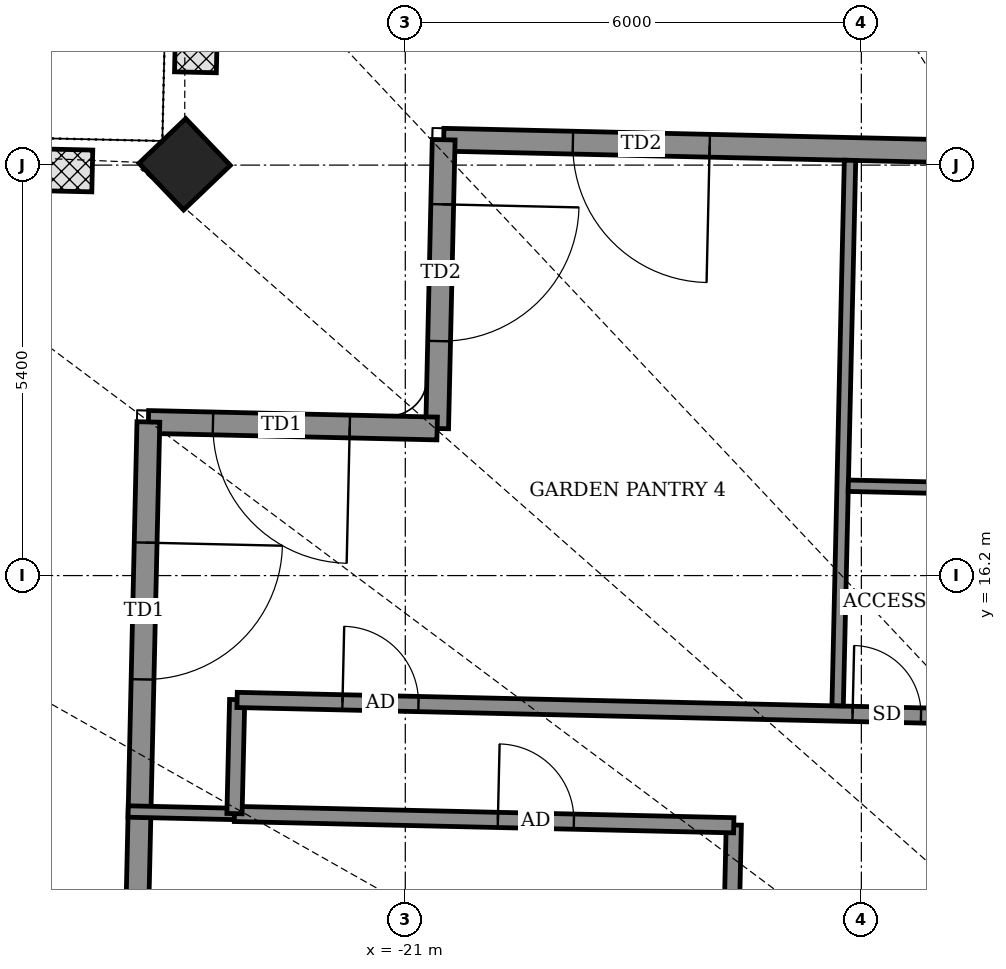
"""IFC4 building model, lengths in metres.
Left out: names, types, materials, properties, quantities, classifications, styles, units other than length and angle.
Written with IfcOpenShell. Run it as: python <this file> out.ifc"""

import sys

from ifc_helpers import new_model, si_unit, direction, frame, frame_2d, origin, origin_2d, place, context, subcontext, project, spatial, rectangle, extrude, element, fill, save


model = new_model("IFC4")
c1 = context("Model", 3, precision=1e-05, world=origin(), true_north=direction((0.0, 1.0)))
c2 = subcontext(c1, "Body", "Model", "MODEL_VIEW")
j1 = project(units=[si_unit("LENGTHUNIT", "METRE"), si_unit("PLANEANGLEUNIT", "RADIAN")], contexts=[c1])
p1 = place(None, origin())
s1 = spatial("IfcSite", under=j1, at=p1, CompositionType="ELEMENT")
p2 = place(p1, origin())
s2 = spatial("IfcBuilding", under=s1, at=p2, CompositionType="ELEMENT")
p3 = place(p2, frame((0.0, 0.0, 337.9)))
s3 = spatial("IfcBuildingStorey", under=s2, at=p3, CompositionType="ELEMENT", Elevation=337.9)
p4 = place(p3, frame((-23.902, 21.611, -0.55), z_axis=(0.0, 0.0, 1.0), x_axis=(-0.723010312757, -0.690837236726, 0.0)))
e1 = element("IfcColumn", 1, at=p4, inside=s3, PredefinedType="COLUMN", context=c2, shape_type="SweptSolid", body=[
    extrude(rectangle(XDim=0.85, YDim=0.85, at=origin_2d()), origin(), (0.0, 0.0, 1.0), 4.6),
])
p5 = place(p3, frame((23.394, 20.938, 0.0), z_axis=(0.0, 0.0, 1.0), x_axis=(-0.99974255281, 0.02268982375, 0.0)))
e2 = element("IfcWall", 2, at=p5, inside=s3, PredefinedType="SOLIDWALL", context=c2, shape_type="SweptSolid", body=[
    extrude(rectangle(XDim=43.9, YDim=0.3, at=frame_2d((21.95, 0.0))), origin(), (0.0, 0.0, 1.0), 2.1),
])
p6 = place(p5, frame((3.151, 0.0, 0.0)))
e3 = element("IfcOpeningElement", 3, at=p6, cuts=e2, PredefinedType="OPENING", context=c2, shape_type="SweptSolid", body=[
    extrude(rectangle(XDim=1.8, YDim=2.0, at=frame_2d((0.9, 1.0))), frame((0.0, 0.16, 0.0), z_axis=(0.0, -1.0, 0.0), x_axis=(1.0, 0.0, 0.0)), (0.0, 0.0, 1.0), 0.32),
])
p7 = place(p5, frame((8.825, 0.0, 0.0)))
e4 = element("IfcOpeningElement", 4, at=p7, cuts=e2, PredefinedType="OPENING", context=c2, shape_type="SweptSolid", body=[
    extrude(rectangle(XDim=1.8, YDim=2.0, at=frame_2d((0.9, 1.0))), frame((0.0, 0.16, 0.0), z_axis=(0.0, -1.0, 0.0), x_axis=(1.0, 0.0, 0.0)), (0.0, 0.0, 1.0), 0.32),
])
p8 = place(p5, frame((13.3, 0.0, 0.0)))
e5 = element("IfcOpeningElement", 5, at=p8, cuts=e2, PredefinedType="OPENING", context=c2, shape_type="SweptSolid", body=[
    extrude(rectangle(XDim=1.8, YDim=2.0, at=frame_2d((0.9, 1.0))), frame((0.0, 0.16, 0.0), z_axis=(0.0, -1.0, 0.0), x_axis=(1.0, 0.0, 0.0)), (0.0, 0.0, 1.0), 0.32),
])
p9 = place(p5, frame((19.275, 0.0, 0.0)))
e6 = element("IfcOpeningElement", 6, at=p9, cuts=e2, PredefinedType="OPENING", context=c2, shape_type="SweptSolid", body=[
    extrude(rectangle(XDim=1.8, YDim=2.0, at=frame_2d((0.9, 1.0))), frame((0.0, 0.16, 0.0), z_axis=(0.0, -1.0, 0.0), x_axis=(1.0, 0.0, 0.0)), (0.0, 0.0, 1.0), 0.32),
])
p10 = place(p5, frame((26.55, 0.0, 0.0)))
e7 = element("IfcOpeningElement", 7, at=p10, cuts=e2, PredefinedType="OPENING", context=c2, shape_type="SweptSolid", body=[
    extrude(rectangle(XDim=1.8, YDim=2.0, at=frame_2d((0.9, 1.0))), frame((0.0, 0.16, 0.0), z_axis=(0.0, -1.0, 0.0), x_axis=(1.0, 0.0, 0.0)), (0.0, 0.0, 1.0), 0.32),
])
p11 = place(p5, frame((33.825, 0.0, 0.0)))
e8 = element("IfcOpeningElement", 8, at=p11, cuts=e2, PredefinedType="OPENING", context=c2, shape_type="SweptSolid", body=[
    extrude(rectangle(XDim=1.8, YDim=2.0, at=frame_2d((0.9, 1.0))), frame((0.0, 0.16, 0.0), z_axis=(0.0, -1.0, 0.0), x_axis=(1.0, 0.0, 0.0)), (0.0, 0.0, 1.0), 0.32),
])
p12 = place(p5, frame((40.4, 0.0, 0.0)))
e9 = element("IfcOpeningElement", 9, at=p12, cuts=e2, PredefinedType="OPENING", context=c2, shape_type="SweptSolid", body=[
    extrude(rectangle(XDim=1.8, YDim=2.0, at=frame_2d((0.9, 1.0))), frame((0.0, 0.16, 0.0), z_axis=(0.0, -1.0, 0.0), x_axis=(1.0, 0.0, 0.0)), (0.0, 0.0, 1.0), 0.32),
])
p13 = place(p3, frame((-20.495, 21.934, 0.0), z_axis=(0.0, 0.0, 1.0), x_axis=(-0.022614868993, -0.999744251146, 0.0)))
e10 = element("IfcWall", 10, at=p13, inside=s3, PredefinedType="SOLIDWALL", context=c2, shape_type="SweptSolid", body=[
    extrude(rectangle(XDim=3.8, YDim=0.3, at=frame_2d((1.9, 0.0))), origin(), (0.0, 0.0, 1.0), 2.1),
])
p14 = place(p13, frame((0.85, 0.0, 0.0)))
e11 = element("IfcOpeningElement", 11, at=p14, cuts=e10, PredefinedType="OPENING", context=c2, shape_type="SweptSolid", body=[
    extrude(rectangle(XDim=1.8, YDim=2.0, at=frame_2d((0.9, 1.0))), frame((0.0, 0.16, 0.0), z_axis=(0.0, -1.0, 0.0), x_axis=(1.0, 0.0, 0.0)), (0.0, 0.0, 1.0), 0.32),
])
p15 = place(p3, frame((-20.581, 18.135, 0.0), z_axis=(0.0, 0.0, 1.0), x_axis=(-0.999744218285, 0.022616321648, 0.0)))
e12 = element("IfcWall", 12, at=p15, inside=s3, PredefinedType="SOLIDWALL", context=c2, shape_type="SweptSolid", body=[
    extrude(rectangle(XDim=3.8, YDim=0.3, at=frame_2d((1.9, 0.0))), origin(), (0.0, 0.0, 1.0), 2.45),
])
p16 = place(p15, frame((1.15, 0.0, 0.0)))
e13 = element("IfcOpeningElement", 13, at=p16, cuts=e12, PredefinedType="OPENING", context=c2, shape_type="SweptSolid", body=[
    extrude(rectangle(XDim=1.8, YDim=2.4, at=frame_2d((0.9, 1.2))), frame((0.0, 0.16, 0.0), z_axis=(0.0, -1.0, 0.0), x_axis=(1.0, 0.0, 0.0)), (0.0, 0.0, 1.0), 0.32),
])
p17 = place(p3, frame((-24.38, 18.221, 0.0), z_axis=(0.0, 0.0, 1.0), x_axis=(-0.022669729545, -0.999743008659, 0.0)))
e14 = element("IfcWall", 14, at=p17, inside=s3, PredefinedType="SOLIDWALL", context=c2, shape_type="SweptSolid", body=[
    extrude(rectangle(XDim=9.229, YDim=0.3, at=frame_2d((4.615, 0.0))), origin(), (0.0, 0.0, 1.0), 2.45),
])
p18 = place(p17, frame((1.588, 0.0, 0.0)))
e15 = element("IfcOpeningElement", 15, at=p18, cuts=e14, PredefinedType="OPENING", context=c2, shape_type="SweptSolid", body=[
    extrude(rectangle(XDim=1.8, YDim=2.4, at=frame_2d((0.9, 1.2))), frame((0.0, 0.16, 0.0), z_axis=(0.0, -1.0, 0.0), x_axis=(1.0, 0.0, 0.0)), (0.0, 0.0, 1.0), 0.32),
])
p19 = place(p17, frame((6.25, 0.0, 0.0)))
e16 = element("IfcOpeningElement", 16, at=p19, cuts=e14, PredefinedType="OPENING", context=c2, shape_type="SweptSolid", body=[
    extrude(rectangle(XDim=1.8, YDim=2.4, at=frame_2d((0.9, 1.2))), frame((0.0, 0.16, 0.0), z_axis=(0.0, -1.0, 0.0), x_axis=(1.0, 0.0, 0.0)), (0.0, 0.0, 1.0), 0.32),
])
p20 = place(p3, frame((-26.655, 21.558, 0.0), z_axis=(0.0, 0.0, 1.0), x_axis=(0.999738546053, -0.022865684662, 0.0)))
e17 = element("IfcWall", 17, at=p20, inside=s3, PredefinedType="USERDEFINED", context=c2, shape_type="SweptSolid", body=[
    extrude(rectangle(XDim=1.538, YDim=0.55, at=frame_2d((0.769, 0.0))), origin(), (0.0, 0.0, 1.0), 0.8),
])
p21 = place(p3, frame((-23.761, 22.821, 0.0), z_axis=(0.0, 0.0, 1.0), x_axis=(0.02260960345, 0.999744370243, 0.0)))
e18 = element("IfcWall", 18, at=p21, inside=s3, PredefinedType="USERDEFINED", context=c2, shape_type="SweptSolid", body=[
    extrude(rectangle(XDim=1.587, YDim=0.55, at=frame_2d((0.794, 0.0))), origin(), (0.0, 0.0, 1.0), 0.8),
])
p22 = place(p3, frame((-17.247, -12.149, 0.0), z_axis=(0.0, 0.0, 1.0), x_axis=(0.022696191528, 0.999742408268, 0.0)))
e19 = element("IfcWall", 19, at=p22, inside=s3, PredefinedType="PARTITIONING", context=c2, shape_type="SweptSolid", body=[
    extrude(rectangle(XDim=25.074, YDim=0.2, at=frame_2d((12.537, 0.0))), origin(), (0.0, 0.0, 1.0), 2.45),
])
p23 = place(p22, frame((19.097, 0.0, 0.0)))
e20 = element("IfcOpeningElement", 20, at=p23, cuts=e19, PredefinedType="OPENING", context=c2, shape_type="SweptSolid", body=[
    extrude(rectangle(XDim=1.0, YDim=2.1, at=frame_2d((0.5, 1.05))), frame((0.0, 0.11, 0.0), z_axis=(0.0, -1.0, 0.0), x_axis=(1.0, 0.0, 0.0)), (0.0, 0.0, 1.0), 0.22),
])
p24 = place(p22, frame((12.875, 0.0, 0.0)))
e21 = element("IfcOpeningElement", 21, at=p24, cuts=e19, PredefinedType="OPENING", context=c2, shape_type="SweptSolid", body=[
    extrude(rectangle(XDim=1.0, YDim=2.1, at=frame_2d((0.5, 1.05))), frame((0.0, 0.11, 0.0), z_axis=(0.0, -1.0, 0.0), x_axis=(1.0, 0.0, 0.0)), (0.0, 0.0, 1.0), 0.22),
])
p25 = place(p22, frame((8.775, 0.0, 0.0)))
e22 = element("IfcOpeningElement", 22, at=p25, cuts=e19, PredefinedType="OPENING", context=c2, shape_type="SweptSolid", body=[
    extrude(rectangle(XDim=0.9, YDim=2.1, at=frame_2d((0.45, 1.05))), frame((0.0, 0.11, 0.0), z_axis=(0.0, -1.0, 0.0), x_axis=(1.0, 0.0, 0.0)), (0.0, 0.0, 1.0), 0.22),
])
p26 = place(p22, frame((6.075, 0.0, 0.0)))
e23 = element("IfcOpeningElement", 23, at=p26, cuts=e19, PredefinedType="OPENING", context=c2, shape_type="SweptSolid", body=[
    extrude(rectangle(XDim=1.0, YDim=2.1, at=frame_2d((0.5, 1.05))), frame((0.0, 0.11, 0.0), z_axis=(0.0, -1.0, 0.0), x_axis=(1.0, 0.0, 0.0)), (0.0, 0.0, 1.0), 0.22),
])
p27 = place(p3, frame((-24.646, 13.096, 0.0), z_axis=(0.0, 0.0, 1.0), x_axis=(0.999740306547, -0.022788581896, 0.0)))
e24 = element("IfcWall", 24, at=p27, inside=s3, PredefinedType="PARTITIONING", context=c2, shape_type="SweptSolid", body=[
    extrude(rectangle(XDim=1.403, YDim=0.15, at=frame_2d((0.702, 0.0))), origin(), (0.0, 0.0, 1.0), 2.45),
])
p28 = place(p3, frame((-23.247, 13.064, 0.0), z_axis=(0.0, 0.0, 1.0), x_axis=(0.999743042775, -0.02266822496, 0.0)))
e25 = element("IfcWall", 25, at=p28, inside=s3, PredefinedType="PARTITIONING", context=c2, shape_type="SweptSolid", body=[
    extrude(rectangle(XDim=6.57, YDim=0.2, at=frame_2d((3.285, 0.0))), origin(), (0.0, 0.0, 1.0), 2.45),
])
p29 = place(p28, frame((3.466, 0.0, 0.0)))
e26 = element("IfcOpeningElement", 26, at=p29, cuts=e25, PredefinedType="OPENING", context=c2, shape_type="SweptSolid", body=[
    extrude(rectangle(XDim=1.0, YDim=2.1, at=frame_2d((0.5, 1.05))), frame((0.0, 0.11, 0.0), z_axis=(0.0, -1.0, 0.0), x_axis=(1.0, 0.0, 0.0)), (0.0, 0.0, 1.0), 0.22),
])
p30 = place(p3, frame((-23.247, 13.068, 0.0), z_axis=(0.0, 0.0, 1.0), x_axis=(0.023431065349, 0.999725454901, 0.0)))
e27 = element("IfcWall", 27, at=p30, inside=s3, PredefinedType="PARTITIONING", context=c2, shape_type="SweptSolid", body=[
    extrude(rectangle(XDim=1.5, YDim=0.2, at=frame_2d((0.75, 0.0))), origin(), (0.0, 0.0, 1.0), 2.45),
])
p31 = place(p3, frame((-23.213, 14.564, 0.0), z_axis=(0.0, 0.0, 1.0), x_axis=(0.999742437097, -0.022694921611, 0.0)))
e28 = element("IfcWall", 28, at=p31, inside=s3, PredefinedType="PARTITIONING", context=c2, shape_type="SweptSolid", body=[
    extrude(rectangle(XDim=49.0, YDim=0.2, at=frame_2d((24.5, 0.0))), origin(), (0.0, 0.0, 1.0), 2.1),
])
p32 = place(p31, frame((42.951, 0.0, 0.0)))
e29 = element("IfcOpeningElement", 29, at=p32, cuts=e28, PredefinedType="OPENING", context=c2, shape_type="SweptSolid", body=[
    extrude(rectangle(XDim=1.0, YDim=2.1, at=frame_2d((0.5, 1.05))), frame((0.0, 0.11, 0.0), z_axis=(0.0, -1.0, 0.0), x_axis=(1.0, 0.0, 0.0)), (0.0, 0.0, 1.0), 0.22),
])
p33 = place(p31, frame((37.2, 0.0, 0.0)))
e30 = element("IfcOpeningElement", 30, at=p33, cuts=e28, PredefinedType="OPENING", context=c2, shape_type="SweptSolid", body=[
    extrude(rectangle(XDim=1.0, YDim=2.1, at=frame_2d((0.5, 1.05))), frame((0.0, 0.11, 0.0), z_axis=(0.0, -1.0, 0.0), x_axis=(1.0, 0.0, 0.0)), (0.0, 0.0, 1.0), 0.22),
])
p34 = place(p31, frame((34.6, 0.0, 0.0)))
e31 = element("IfcOpeningElement", 31, at=p34, cuts=e28, PredefinedType="OPENING", context=c2, shape_type="SweptSolid", body=[
    extrude(rectangle(XDim=0.9, YDim=2.1, at=frame_2d((0.45, 1.05))), frame((0.0, 0.11, 0.0), z_axis=(0.0, -1.0, 0.0), x_axis=(1.0, 0.0, 0.0)), (0.0, 0.0, 1.0), 0.22),
])
p35 = place(p31, frame((30.374, 0.0, 0.0)))
e32 = element("IfcOpeningElement", 32, at=p35, cuts=e28, PredefinedType="OPENING", context=c2, shape_type="SweptSolid", body=[
    extrude(rectangle(XDim=1.0, YDim=2.1, at=frame_2d((0.5, 1.05))), frame((0.0, 0.11, 0.0), z_axis=(0.0, -1.0, 0.0), x_axis=(1.0, 0.0, 0.0)), (0.0, 0.0, 1.0), 0.22),
])
p36 = place(p31, frame((25.76, 0.0, 0.0)))
e33 = element("IfcOpeningElement", 33, at=p36, cuts=e28, PredefinedType="OPENING", context=c2, shape_type="SweptSolid", body=[
    extrude(rectangle(XDim=1.0, YDim=2.1, at=frame_2d((0.5, 1.05))), frame((0.0, 0.11, 0.0), z_axis=(0.0, -1.0, 0.0), x_axis=(1.0, 0.0, 0.0)), (0.0, 0.0, 1.0), 0.22),
])
p37 = place(p31, frame((22.65, 0.0, 0.0)))
e34 = element("IfcOpeningElement", 34, at=p37, cuts=e28, PredefinedType="OPENING", context=c2, shape_type="SweptSolid", body=[
    extrude(rectangle(XDim=0.9, YDim=2.1, at=frame_2d((0.45, 1.05))), frame((0.0, 0.11, 0.0), z_axis=(0.0, -1.0, 0.0), x_axis=(1.0, 0.0, 0.0)), (0.0, 0.0, 1.0), 0.22),
])
p38 = place(p31, frame((15.938, 0.0, 0.0)))
e35 = element("IfcOpeningElement", 35, at=p38, cuts=e28, PredefinedType="OPENING", context=c2, shape_type="SweptSolid", body=[
    extrude(rectangle(XDim=1.0, YDim=2.1, at=frame_2d((0.5, 1.05))), frame((0.0, 0.11, 0.0), z_axis=(0.0, -1.0, 0.0), x_axis=(1.0, 0.0, 0.0)), (0.0, 0.0, 1.0), 0.22),
])
p39 = place(p31, frame((20.25, 0.0, 0.0)))
e36 = element("IfcOpeningElement", 36, at=p39, cuts=e28, PredefinedType="OPENING", context=c2, shape_type="SweptSolid", body=[
    extrude(rectangle(XDim=0.9, YDim=2.1, at=frame_2d((0.45, 1.05))), frame((0.0, 0.11, 0.0), z_axis=(0.0, -1.0, 0.0), x_axis=(1.0, 0.0, 0.0)), (0.0, 0.0, 1.0), 0.22),
])
p40 = place(p31, frame((11.214, 0.0, 0.0)))
e37 = element("IfcOpeningElement", 37, at=p40, cuts=e28, PredefinedType="OPENING", context=c2, shape_type="SweptSolid", body=[
    extrude(rectangle(XDim=1.0, YDim=2.1, at=frame_2d((0.5, 1.05))), frame((0.0, 0.11, 0.0), z_axis=(0.0, -1.0, 0.0), x_axis=(1.0, 0.0, 0.0)), (0.0, 0.0, 1.0), 0.22),
])
p41 = place(p31, frame((8.1, 0.0, 0.0)))
e38 = element("IfcOpeningElement", 38, at=p41, cuts=e28, PredefinedType="OPENING", context=c2, shape_type="SweptSolid", body=[
    extrude(rectangle(XDim=0.9, YDim=2.1, at=frame_2d((0.45, 1.05))), frame((0.0, 0.11, 0.0), z_axis=(0.0, -1.0, 0.0), x_axis=(1.0, 0.0, 0.0)), (0.0, 0.0, 1.0), 0.22),
])
p42 = place(p31, frame((1.387, 0.0, 0.0)))
e39 = element("IfcOpeningElement", 39, at=p42, cuts=e28, PredefinedType="OPENING", context=c2, shape_type="SweptSolid", body=[
    extrude(rectangle(XDim=1.0, YDim=2.1, at=frame_2d((0.5, 1.05))), frame((0.0, 0.11, 0.0), z_axis=(0.0, -1.0, 0.0), x_axis=(1.0, 0.0, 0.0)), (0.0, 0.0, 1.0), 0.22),
])
p43 = place(p3, frame((-15.312, 14.488, 0.0), z_axis=(0.0, 0.0, 1.0), x_axis=(0.022723723534, 0.999741782856, 0.0)))
e40 = element("IfcWall", 40, at=p43, inside=s3, PredefinedType="PARTITIONING", context=c2, shape_type="SweptSolid", body=[
    extrude(rectangle(XDim=7.177, YDim=0.15, at=frame_2d((3.588, 0.0))), origin(), (0.0, 0.0, 1.0), 2.1),
])
p44 = place(p3, frame((-15.172, 17.382, 0.0), z_axis=(0.0, 0.0, 1.0), x_axis=(0.999744175585, -0.022618209135, 0.0)))
e41 = element("IfcWall", 41, at=p44, inside=s3, PredefinedType="PARTITIONING", context=c2, shape_type="SweptSolid", body=[
    extrude(rectangle(XDim=2.526, YDim=0.15, at=frame_2d((1.263, 0.0))), origin(), (0.0, 0.0, 1.0), 4.05),
])
p45 = place(p12, origin())
e42 = element("IfcDoor", 42, at=p45, inside=s3, OperationType="DOUBLE_DOOR_SINGLE_SWING", PredefinedType="DOOR", context=c2, shape_type="SweptSolid", body=[
    extrude(rectangle(XDim=1.8, YDim=2.0, at=frame_2d((0.9, 1.0))), frame((0.0, 0.025, 0.0), z_axis=(0.0, -1.0, 0.0), x_axis=(1.0, 0.0, 0.0)), (0.0, 0.0, 1.0), 0.05),
])
fill(e9, e42)
p46 = place(p14, origin())
e43 = element("IfcDoor", 43, at=p46, inside=s3, OperationType="DOUBLE_DOOR_SINGLE_SWING", PredefinedType="DOOR", context=c2, shape_type="SweptSolid", body=[
    extrude(rectangle(XDim=1.8, YDim=2.0, at=frame_2d((0.9, 1.0))), frame((0.0, 0.025, 0.0), z_axis=(0.0, -1.0, 0.0), x_axis=(1.0, 0.0, 0.0)), (0.0, 0.0, 1.0), 0.05),
])
fill(e11, e43)
p47 = place(p16, origin())
e44 = element("IfcDoor", 44, at=p47, inside=s3, OperationType="DOUBLE_DOOR_SINGLE_SWING", PredefinedType="DOOR", context=c2, shape_type="SweptSolid", body=[
    extrude(rectangle(XDim=1.8, YDim=2.4, at=frame_2d((0.9, 1.2))), frame((0.0, 0.025, 0.0), z_axis=(0.0, -1.0, 0.0), x_axis=(1.0, 0.0, 0.0)), (0.0, 0.0, 1.0), 0.05),
])
fill(e13, e44)
p48 = place(p18, origin())
e45 = element("IfcDoor", 45, at=p48, inside=s3, OperationType="DOUBLE_DOOR_SINGLE_SWING", PredefinedType="DOOR", context=c2, shape_type="SweptSolid", body=[
    extrude(rectangle(XDim=1.8, YDim=2.4, at=frame_2d((0.9, 1.2))), frame((0.0, 0.025, 0.0), z_axis=(0.0, -1.0, 0.0), x_axis=(1.0, 0.0, 0.0)), (0.0, 0.0, 1.0), 0.05),
])
fill(e15, e45)
p49 = place(p41, origin())
e46 = element("IfcDoor", 46, at=p49, inside=s3, OperationType="SINGLE_SWING_LEFT", PredefinedType="DOOR", context=c2, shape_type="SweptSolid", body=[
    extrude(rectangle(XDim=0.9, YDim=2.1, at=frame_2d((0.45, 1.05))), frame((0.0, 0.025, 0.0), z_axis=(0.0, -1.0, 0.0), x_axis=(1.0, 0.0, 0.0)), (0.0, 0.0, 1.0), 0.05),
])
fill(e38, e46)
p50 = place(p42, origin())
e47 = element("IfcDoor", 47, at=p50, inside=s3, OperationType="SINGLE_SWING_RIGHT", PredefinedType="DOOR", context=c2, shape_type="SweptSolid", body=[
    extrude(rectangle(XDim=1.0, YDim=2.1, at=frame_2d((0.5, 1.05))), frame((0.0, 0.025, 0.0), z_axis=(0.0, -1.0, 0.0), x_axis=(1.0, 0.0, 0.0)), (0.0, 0.0, 1.0), 0.05),
])
fill(e39, e47)
p51 = place(p29, origin())
e48 = element("IfcDoor", 48, at=p51, inside=s3, OperationType="SINGLE_SWING_LEFT", PredefinedType="DOOR", context=c2, shape_type="SweptSolid", body=[
    extrude(rectangle(XDim=1.0, YDim=2.1, at=frame_2d((0.5, 1.05))), frame((0.0, 0.025, 0.0), z_axis=(0.0, -1.0, 0.0), x_axis=(1.0, 0.0, 0.0)), (0.0, 0.0, 1.0), 0.05),
])
fill(e26, e48)
save(model, sys.argv[1])
